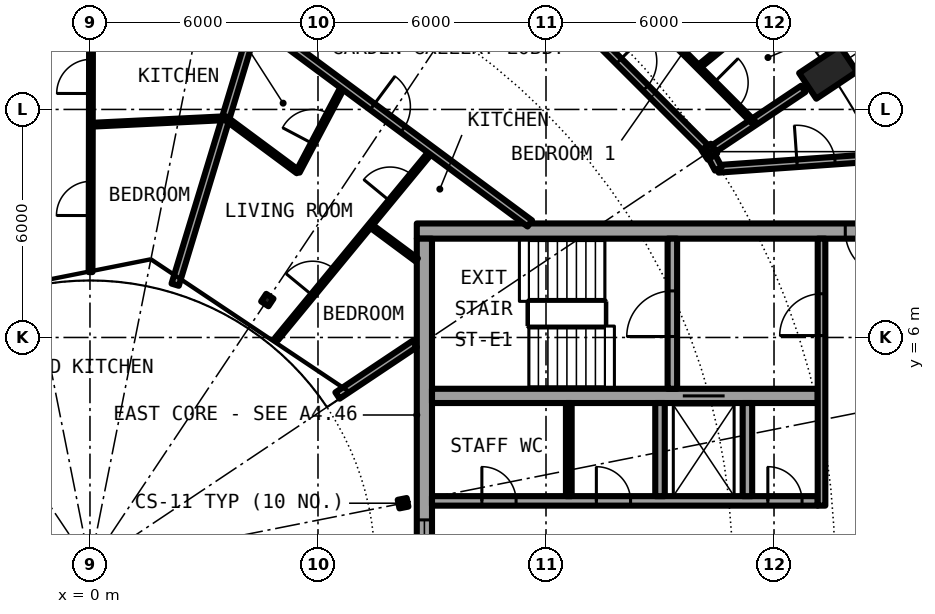
"""IFC4 building model, lengths in metres.
Left out: names, types, materials, properties, quantities, classifications, styles, units other than length and angle.
Written with IfcOpenShell. Run it as: python <this file> out.ifc"""

import sys

from ifc_helpers import new_model, si_unit, direction, frame, frame_2d, origin, origin_2d, place, context, subcontext, project, spatial, rectangle, hollow_circle, i_section, extrude, element, fill, save


model = new_model("IFC4")
c1 = context("Model", 3, precision=1e-05, world=origin(), true_north=direction((0.0, 1.0)))
c2 = subcontext(c1, "Body", "Model", "MODEL_VIEW")
j1 = project(units=[si_unit("LENGTHUNIT", "METRE"), si_unit("PLANEANGLEUNIT", "RADIAN")], contexts=[c1])
p1 = place(None, origin())
s1 = spatial("IfcSite", under=j1, at=p1, CompositionType="ELEMENT")
p2 = place(p1, origin())
s2 = spatial("IfcBuilding", under=s1, at=p2, CompositionType="ELEMENT")
p3 = place(p2, frame((0.0, 0.0, 246.25)))
s3 = spatial("IfcBuildingStorey", under=s2, at=p3, CompositionType="ELEMENT", Elevation=246.25)
p4 = place(p3, frame((19.955, 13.334, 0.0), z_axis=(-0.346819263352, -0.231767499499, 0.908845545043), x_axis=(0.555620411262, -0.831436082083, 0.0)))
e1 = element("IfcColumn", 1, at=p4, inside=s3, PredefinedType="COLUMN", context=c2, shape_type="SweptSolid", body=[
    extrude(hollow_circle(Radius=0.406, WallThickness=0.03, at=origin_2d()), origin(), (0.0, 0.0, 1.0), 3.081),
])
p5 = place(p3, frame((16.297, 10.889, 0.0), z_axis=(0.0, 0.0, 1.0), x_axis=(0.831469612303, 0.55557023302, 0.0)))
e2 = element("IfcColumn", 2, at=p5, inside=s3, PredefinedType="COLUMN", context=c2, shape_type="SweptSolid", body=[
    extrude(i_section(OverallWidth=0.3, OverallDepth=0.3, WebThickness=0.011, FlangeThickness=0.019, FilletRadius=0.027, at=origin_2d()), origin(), (0.0, 0.0, 1.0), 3.05),
])
for number, where, z_axis, x_axis in (
    (3, (8.239, 1.639, 0.0), (0.0, 0.0, 1.0), (0.981, 0.195, 0.0)),
    (4, (4.667, 6.984, 0.0), (0.0, 0.0, 1.0), (0.556, 0.831, 0.0)),
):
    element("IfcColumn", number, at=place(p3, frame(where, z_axis=z_axis, x_axis=x_axis)), inside=s3, PredefinedType="COLUMN", context=c2, shape_type="SweptSolid", body=[
        extrude(i_section(OverallWidth=0.24, OverallDepth=0.23, WebThickness=0.008, FlangeThickness=0.012, FilletRadius=0.021, at=origin_2d()), origin(), (0.0, 0.0, 1.0), 3.05),
    ])
p6 = place(p3, frame((22.0, 8.8, 0.0), z_axis=(0.0, 0.0, 1.0), x_axis=(-1.0, 0.0, 0.0)))
e5 = element("IfcWall", 5, at=p6, inside=s3, PredefinedType="SHEAR", context=c2, shape_type="SweptSolid", body=[
    extrude(rectangle(XDim=13.4, YDim=0.4, at=frame_2d((6.7, 0.0))), origin(), (0.0, 0.0, 1.0), 3.05),
])
p7 = place(p6, frame((0.925, 0.0, 0.0)))
e6 = element("IfcOpeningElement", 6, at=p7, cuts=e5, PredefinedType="OPENING", context=c2, shape_type="SweptSolid", body=[
    extrude(rectangle(XDim=1.2, YDim=2.3, at=frame_2d((0.6, 1.15))), frame((0.0, 0.21, 0.0), z_axis=(0.0, -1.0, 0.0), x_axis=(1.0, 0.0, 0.0)), (0.0, 0.0, 1.0), 0.42),
])
p8 = place(p3, frame((8.8, -8.6, 0.0), z_axis=(0.0, 0.0, 1.0), x_axis=(0.0, 1.0, 0.0)))
e7 = element("IfcWall", 7, at=p8, inside=s3, PredefinedType="SHEAR", context=c2, shape_type="SweptSolid", body=[
    extrude(rectangle(XDim=17.2, YDim=0.4, at=frame_2d((8.6, 0.0))), origin(), (0.0, 0.0, 1.0), 3.05),
])
p9 = place(p8, frame((7.4, 0.0, 0.1)))
e8 = element("IfcOpeningElement", 8, at=p9, cuts=e7, PredefinedType="OPENING", context=c2, shape_type="SweptSolid", body=[
    extrude(rectangle(XDim=2.4, YDim=2.2, at=frame_2d((1.2, 1.1))), frame((0.0, 0.21, 0.0), z_axis=(0.0, -1.0, 0.0), x_axis=(1.0, 0.0, 0.0)), (0.0, 0.0, 1.0), 0.42),
])
p10 = place(p3, frame((9.0, 1.7, 0.0), z_axis=(0.0, 0.0, 1.0), x_axis=(1.0, 0.0, 0.0)))
e9 = element("IfcWall", 9, at=p10, inside=s3, PredefinedType="SHEAR", context=c2, shape_type="SweptSolid", body=[
    extrude(rectangle(XDim=10.15, YDim=0.25, at=frame_2d((5.075, 0.0))), origin(), (0.0, 0.0, 1.0), 3.05),
])
p11 = place(p10, frame((1.312, 0.0, 0.0)))
e10 = element("IfcOpeningElement", 10, at=p11, cuts=e9, PredefinedType="OPENING", context=c2, shape_type="SweptSolid", body=[
    extrude(rectangle(XDim=0.9, YDim=2.3, at=frame_2d((0.45, 1.15))), frame((0.0, 0.135, 0.0), z_axis=(0.0, -1.0, 0.0), x_axis=(1.0, 0.0, 0.0)), (0.0, 0.0, 1.0), 0.27),
])
p12 = place(p10, frame((4.325, 0.0, 0.0)))
e11 = element("IfcOpeningElement", 11, at=p12, cuts=e9, PredefinedType="OPENING", context=c2, shape_type="SweptSolid", body=[
    extrude(rectangle(XDim=0.9, YDim=2.3, at=frame_2d((0.45, 1.15))), frame((0.0, 0.135, 0.0), z_axis=(0.0, -1.0, 0.0), x_axis=(1.0, 0.0, 0.0)), (0.0, 0.0, 1.0), 0.27),
])
p13 = place(p10, frame((8.837, 0.0, 0.0)))
e12 = element("IfcOpeningElement", 12, at=p13, cuts=e9, PredefinedType="OPENING", context=c2, shape_type="SweptSolid", body=[
    extrude(rectangle(XDim=0.9, YDim=2.3, at=frame_2d((0.45, 1.15))), frame((0.0, 0.135, 0.0), z_axis=(0.0, -1.0, 0.0), x_axis=(1.0, 0.0, 0.0)), (0.0, 0.0, 1.0), 0.27),
])
p14 = place(p3, frame((9.0, 4.462, 0.0), z_axis=(0.0, 0.0, 1.0), x_axis=(1.0, 0.0, 0.0)))
e13 = element("IfcWall", 13, at=p14, inside=s3, PredefinedType="SHEAR", context=c2, shape_type="SweptSolid", body=[
    extrude(rectangle(XDim=10.15, YDim=0.375, at=frame_2d((5.075, 0.0))), origin(), (0.0, 0.0, 1.0), 3.05),
])
p15 = place(p14, frame((6.6, 0.0, 0.0)))
e14 = element("IfcOpeningElement", 14, at=p15, cuts=e13, PredefinedType="OPENING", context=c2, shape_type="SweptSolid", body=[
    extrude(rectangle(XDim=1.1, YDim=2.3, at=frame_2d((0.55, 1.15))), frame((0.0, 0.198, 0.0), z_axis=(0.0, -1.0, 0.0), x_axis=(1.0, 0.0, 0.0)), (0.0, 0.0, 1.0), 0.395),
])
p16 = place(p3, frame((15.325, 4.65, 0.0), z_axis=(0.0, 0.0, 1.0), x_axis=(0.0, 1.0, 0.0)))
e15 = element("IfcWall", 15, at=p16, inside=s3, PredefinedType="SHEAR", context=c2, shape_type="SweptSolid", body=[
    extrude(rectangle(XDim=3.95, YDim=0.25, at=frame_2d((1.975, 0.0))), origin(), (0.0, 0.0, 1.0), 3.05),
])
p17 = place(p16, frame((1.375, 0.0, 0.0)))
e16 = element("IfcOpeningElement", 16, at=p17, cuts=e15, PredefinedType="OPENING", context=c2, shape_type="SweptSolid", body=[
    extrude(rectangle(XDim=1.2, YDim=2.3, at=frame_2d((0.6, 1.15))), frame((0.0, 0.135, 0.0), z_axis=(0.0, -1.0, 0.0), x_axis=(1.0, 0.0, 0.0)), (0.0, 0.0, 1.0), 0.27),
])
for number, where, z_axis, x_axis in (
    (17, (15.0, 1.825, 0.0), (0.0, 0.0, 1.0), (0.0, 1.0, 0.0)),
    (18, (17.3, 1.825, 0.0), (0.0, 0.0, 1.0), (0.0, 1.0, 0.0)),
):
    element("IfcWall", number, at=place(p3, frame(where, z_axis=z_axis, x_axis=x_axis)), inside=s3, PredefinedType="SOLIDWALL", context=c2, shape_type="SweptSolid", body=[
        extrude(rectangle(XDim=2.45, YDim=0.25, at=frame_2d((1.225, 0.0))), origin(), (0.0, 0.0, 1.0), 2.7),
    ])
p18 = place(p3, frame((19.25, 1.575, 0.0), z_axis=(0.0, 0.0, 1.0), x_axis=(0.0, 1.0, 0.0)))
e19 = element("IfcWall", 19, at=p18, inside=s3, PredefinedType="SOLIDWALL", context=c2, shape_type="SweptSolid", body=[
    extrude(rectangle(XDim=7.025, YDim=0.2, at=frame_2d((3.513, 0.0))), origin(), (0.0, 0.0, 1.0), 2.7),
])
p19 = place(p18, frame((4.475, 0.0, 0.0)))
e20 = element("IfcOpeningElement", 20, at=p19, cuts=e19, PredefinedType="OPENING", context=c2, shape_type="SweptSolid", body=[
    extrude(rectangle(XDim=1.1, YDim=2.3, at=frame_2d((0.55, 1.15))), frame((0.0, 0.11, 0.0), z_axis=(0.0, -1.0, 0.0), x_axis=(1.0, 0.0, 0.0)), (0.0, 0.0, 1.0), 0.22),
])
p20 = place(p3, frame((12.6, 1.825, 0.0), z_axis=(0.0, 0.0, 1.0), x_axis=(0.0, 1.0, 0.0)))
e21 = element("IfcWall", 21, at=p20, inside=s3, PredefinedType="PARTITIONING", context=c2, shape_type="SweptSolid", body=[
    extrude(rectangle(XDim=2.45, YDim=0.15, at=frame_2d((1.225, 0.0))), origin(), (0.0, 0.0, 1.0), 2.7),
])
p21 = place(p3, frame((0.015, 7.72, 0.0), z_axis=(0.0, 0.0, 1.0), x_axis=(0.00205283734, 0.999997892927, 0.0)))
e22 = element("IfcWall", 22, at=p21, inside=s3, PredefinedType="PARTITIONING", context=c2, shape_type="SweptSolid", body=[
    extrude(rectangle(XDim=6.422, YDim=0.1, at=frame_2d((3.211, 0.0))), origin(), (0.0, 0.0, 1.0), 2.7),
])
p22 = place(p21, frame((4.699, 0.0, 0.0)))
e23 = element("IfcOpeningElement", 23, at=p22, cuts=e22, PredefinedType="OPENING", context=c2, shape_type="SweptSolid", body=[
    extrude(rectangle(XDim=0.9, YDim=2.3, at=frame_2d((0.45, 1.15))), frame((0.0, 0.06, 0.0), z_axis=(0.0, -1.0, 0.0), x_axis=(1.0, 0.0, 0.0)), (0.0, 0.0, 1.0), 0.12),
])
p23 = place(p21, frame((1.488, 0.0, 0.0)))
e24 = element("IfcOpeningElement", 24, at=p23, cuts=e22, PredefinedType="OPENING", context=c2, shape_type="SweptSolid", body=[
    extrude(rectangle(XDim=0.9, YDim=2.3, at=frame_2d((0.45, 1.15))), frame((0.0, 0.06, 0.0), z_axis=(0.0, -1.0, 0.0), x_axis=(1.0, 0.0, 0.0)), (0.0, 0.0, 1.0), 0.12),
])
p24 = place(p3, frame((2.242, 7.388, 0.0), z_axis=(0.0, 0.0, 1.0), x_axis=(0.291087364513, 0.956696475493, 0.0)))
e25 = element("IfcWall", 25, at=p24, inside=s3, PredefinedType="PARTITIONING", context=c2, shape_type="SweptSolid", body=[
    extrude(rectangle(XDim=4.579, YDim=0.2, at=frame_2d((2.29, 0.0))), origin(), (0.0, 0.0, 1.0), 2.7),
])
p25 = place(p3, frame((3.571, 11.77, 0.0), z_axis=(0.0, 0.0, 1.0), x_axis=(0.289984808601, 0.957031248592, 0.0)))
e26 = element("IfcWall", 26, at=p25, inside=s3, PredefinedType="PARTITIONING", context=c2, shape_type="SweptSolid", body=[
    extrude(rectangle(XDim=2.7, YDim=0.2, at=frame_2d((1.35, 0.0))), origin(), (0.0, 0.0, 1.0), 2.7),
])
p26 = place(p3, frame((4.909, 5.958, 0.0), z_axis=(0.0, 0.0, 1.0), x_axis=(0.635941750694, 0.771737059965, 0.0)))
e27 = element("IfcWall", 27, at=p26, inside=s3, PredefinedType="PARTITIONING", context=c2, shape_type="SweptSolid", body=[
    extrude(rectangle(XDim=6.422, YDim=0.1, at=frame_2d((3.211, 0.0))), origin(), (0.0, 0.0, 1.0), 2.7),
])
p27 = place(p26, frame((4.699, 0.0, 0.0)))
e28 = element("IfcOpeningElement", 28, at=p27, cuts=e27, PredefinedType="OPENING", context=c2, shape_type="SweptSolid", body=[
    extrude(rectangle(XDim=0.9, YDim=2.3, at=frame_2d((0.45, 1.15))), frame((0.0, 0.06, 0.0), z_axis=(0.0, -1.0, 0.0), x_axis=(1.0, 0.0, 0.0)), (0.0, 0.0, 1.0), 0.12),
])
p28 = place(p26, frame((1.488, 0.0, 0.0)))
e29 = element("IfcOpeningElement", 29, at=p28, cuts=e27, PredefinedType="OPENING", context=c2, shape_type="SweptSolid", body=[
    extrude(rectangle(XDim=0.9, YDim=2.3, at=frame_2d((0.45, 1.15))), frame((0.0, 0.06, 0.0), z_axis=(0.0, -1.0, 0.0), x_axis=(1.0, 0.0, 0.0)), (0.0, 0.0, 1.0), 0.12),
])
p29 = place(p3, frame((5.472, 10.36, 0.0), z_axis=(0.0, 0.0, 1.0), x_axis=(0.467373035141, 0.884060204976, 0.0)))
e30 = element("IfcWall", 30, at=p29, inside=s3, PredefinedType="PARTITIONING", context=c2, shape_type="SweptSolid", body=[
    extrude(rectangle(XDim=2.572, YDim=0.1, at=frame_2d((1.286, 0.0))), origin(), (0.0, 0.0, 1.0), 2.7),
])
p30 = place(p29, frame((0.836, 0.0, 0.0)))
e31 = element("IfcOpeningElement", 31, at=p30, cuts=e30, PredefinedType="OPENING", context=c2, shape_type="SweptSolid", body=[
    extrude(rectangle(XDim=0.9, YDim=2.3, at=frame_2d((0.45, 1.15))), frame((0.0, 0.06, 0.0), z_axis=(0.0, -1.0, 0.0), x_axis=(1.0, 0.0, 0.0)), (0.0, 0.0, 1.0), 0.12),
])
p31 = place(p3, frame((16.012, 13.115, 0.0), z_axis=(0.0, 0.0, 1.0), x_axis=(0.773640700514, 0.633624546958, 0.0)))
e32 = element("IfcWall", 32, at=p31, inside=s3, PredefinedType="PARTITIONING", context=c2, shape_type="SweptSolid", body=[
    extrude(rectangle(XDim=3.677, YDim=0.1, at=frame_2d((1.839, 0.0))), origin(), (0.0, 0.0, 1.0), 2.7),
])
p32 = place(p3, frame((16.422, 10.972, 0.0), z_axis=(0.0, 0.0, 1.0), x_axis=(0.83131782921, 0.555797325324, 0.0)))
e33 = element("IfcWall", 33, at=p32, inside=s3, PredefinedType="PARTITIONING", context=c2, shape_type="SweptSolid", body=[
    extrude(rectangle(XDim=2.823, YDim=0.2, at=frame_2d((1.412, 0.0))), origin(), (0.0, 0.0, 1.0), 2.7),
])
p33 = place(p3, frame((6.513, 4.472, 0.0), z_axis=(0.0, 0.0, 1.0), x_axis=(0.831450132577, 0.555599385382, 0.0)))
e34 = element("IfcWall", 34, at=p33, inside=s3, PredefinedType="PARTITIONING", context=c2, shape_type="SweptSolid", body=[
    extrude(rectangle(XDim=2.443, YDim=0.2, at=frame_2d((1.221, 0.0))), origin(), (0.0, 0.0, 1.0), 2.7),
])
p34 = place(p3, frame((16.535, 10.437, 0.0), z_axis=(0.0, 0.0, 1.0), x_axis=(0.997515141784, 0.070452408845, 0.0)))
e35 = element("IfcWall", 35, at=p34, inside=s3, PredefinedType="PARTITIONING", context=c2, shape_type="SweptSolid", body=[
    extrude(rectangle(XDim=5.153, YDim=0.2, at=frame_2d((2.576, 0.0))), origin(), (0.0, 0.0, 1.0), 2.7),
])
p35 = place(p34, frame((2.076, 0.0, 0.0)))
e36 = element("IfcOpeningElement", 36, at=p35, cuts=e35, PredefinedType="OPENING", context=c2, shape_type="SweptSolid", body=[
    extrude(rectangle(XDim=1.0, YDim=2.3, at=frame_2d((0.5, 1.15))), frame((0.0, 0.11, 0.0), z_axis=(0.0, -1.0, 0.0), x_axis=(1.0, 0.0, 0.0)), (0.0, 0.0, 1.0), 0.22),
])
p36 = place(p3, frame((0.023, 11.596, 0.0), z_axis=(0.0, 0.0, 1.0), x_axis=(0.998798689193, 0.049001821055, 0.0)))
e37 = element("IfcWall", 37, at=p36, inside=s3, PredefinedType="PARTITIONING", context=c2, shape_type="SweptSolid", body=[
    extrude(rectangle(XDim=3.552, YDim=0.1, at=frame_2d((1.776, 0.0))), origin(), (0.0, 0.0, 1.0), 2.7),
])
p37 = place(p3, frame((3.569, 11.77, 0.0), z_axis=(0.0, 0.0, 1.0), x_axis=(0.803379855413, -0.5954668823, 0.0)))
e38 = element("IfcWall", 38, at=p37, inside=s3, PredefinedType="PARTITIONING", context=c2, shape_type="SweptSolid", body=[
    extrude(rectangle(XDim=2.366, YDim=0.1, at=frame_2d((1.183, 0.0))), origin(), (0.0, 0.0, 1.0), 2.7),
])
p38 = place(p3, frame((7.374, 8.949, 0.0), z_axis=(0.0, 0.0, 1.0), x_axis=(0.80332760487, -0.595537370157, 0.0)))
e39 = element("IfcWall", 39, at=p38, inside=s3, PredefinedType="PARTITIONING", context=c2, shape_type="SweptSolid", body=[
    extrude(rectangle(XDim=1.526, YDim=0.1, at=frame_2d((0.763, 0.0))), origin(), (0.0, 0.0, 1.0), 2.7),
])
p39 = place(p3, frame((4.355, 14.353, 0.0), z_axis=(0.0, 0.0, 1.0), x_axis=(0.80325776554, -0.595631565735, 0.0)))
e40 = element("IfcWall", 40, at=p39, inside=s3, PredefinedType="PARTITIONING", context=c2, shape_type="SweptSolid", body=[
    extrude(rectangle(XDim=8.987, YDim=0.2, at=frame_2d((4.494, 0.0))), origin(), (0.0, 0.0, 1.0), 2.7),
])
p40 = place(p39, frame((3.83, 0.0, 0.0)))
e41 = element("IfcOpeningElement", 41, at=p40, cuts=e40, PredefinedType="OPENING", context=c2, shape_type="SweptSolid", body=[
    extrude(rectangle(XDim=1.0, YDim=2.3, at=frame_2d((0.5, 1.15))), frame((0.0, 0.11, 0.0), z_axis=(0.0, -1.0, 0.0), x_axis=(1.0, 0.0, 0.0)), (0.0, 0.0, 1.0), 0.22),
])
p41 = place(p3, frame((10.997, 16.189, 0.0), z_axis=(0.0, 0.0, 1.0), x_axis=(0.707106781187, -0.707106781187, 0.0)))
e42 = element("IfcWall", 42, at=p41, inside=s3, PredefinedType="PARTITIONING", context=c2, shape_type="SweptSolid", body=[
    extrude(rectangle(XDim=7.343, YDim=0.2, at=frame_2d((3.671, 0.0))), origin(), (0.0, 0.0, 1.0), 2.45),
])
p42 = place(p41, frame((4.127, 0.0, 0.0)))
e43 = element("IfcOpeningElement", 43, at=p42, cuts=e42, PredefinedType="OPENING", context=c2, shape_type="SweptSolid", body=[
    extrude(rectangle(XDim=1.0, YDim=2.3, at=frame_2d((0.5, 1.15))), frame((0.0, 0.11, 0.0), z_axis=(0.0, -1.0, 0.0), x_axis=(1.0, 0.0, 0.0)), (0.0, 0.0, 1.0), 0.22),
])
p43 = place(p3, frame((16.367, 10.756, 0.0), z_axis=(0.0, 0.0, 1.0), x_axis=(0.465802239822, -0.884888848035, 0.0)))
e44 = element("IfcWall", 44, at=p43, inside=s3, PredefinedType="PARTITIONING", context=c2, shape_type="SweptSolid", body=[
    extrude(rectangle(XDim=0.361, YDim=0.2, at=frame_2d((0.18, 0.0))), origin(), (0.0, 0.0, 1.0), 2.7),
])
p44 = place(p3, frame((14.563, 14.563, 0.0), z_axis=(0.0, 0.0, 1.0), x_axis=(0.70686919808, -0.707344284494, 0.0)))
e45 = element("IfcWall", 45, at=p44, inside=s3, PredefinedType="PARTITIONING", context=c2, shape_type="SweptSolid", body=[
    extrude(rectangle(XDim=4.111, YDim=0.1, at=frame_2d((2.056, 0.0))), origin(), (0.0, 0.0, 1.0), 2.7),
])
p45 = place(p44, frame((2.626, 0.0, 0.0)))
e46 = element("IfcOpeningElement", 46, at=p45, cuts=e45, PredefinedType="OPENING", context=c2, shape_type="SweptSolid", body=[
    extrude(rectangle(XDim=0.9, YDim=2.3, at=frame_2d((0.45, 1.15))), frame((0.0, 0.06, 0.0), z_axis=(0.0, -1.0, 0.0), x_axis=(1.0, 0.0, 0.0)), (0.0, 0.0, 1.0), 0.12),
])
p46 = place(p15, origin())
e47 = element("IfcDoor", 47, at=p46, inside=s3, OperationType="DOUBLE_DOOR_SLIDING", PredefinedType="DOOR", context=c2, shape_type="SweptSolid", body=[
    extrude(rectangle(XDim=1.1, YDim=2.3, at=frame_2d((0.55, 1.15))), frame((0.0, 0.025, 0.0), z_axis=(0.0, -1.0, 0.0), x_axis=(1.0, 0.0, 0.0)), (0.0, 0.0, 1.0), 0.05),
])
fill(e14, e47)
p47 = place(p11, origin())
e48 = element("IfcDoor", 48, at=p47, inside=s3, OperationType="SINGLE_SWING_RIGHT", PredefinedType="DOOR", context=c2, shape_type="SweptSolid", body=[
    extrude(rectangle(XDim=0.9, YDim=2.3, at=frame_2d((0.45, 1.15))), frame((0.0, 0.025, 0.0), z_axis=(0.0, -1.0, 0.0), x_axis=(1.0, 0.0, 0.0)), (0.0, 0.0, 1.0), 0.05),
])
fill(e10, e48)
p48 = place(p12, origin())
e49 = element("IfcDoor", 49, at=p48, inside=s3, OperationType="SINGLE_SWING_RIGHT", PredefinedType="DOOR", context=c2, shape_type="SweptSolid", body=[
    extrude(rectangle(XDim=0.9, YDim=2.3, at=frame_2d((0.45, 1.15))), frame((0.0, 0.025, 0.0), z_axis=(0.0, -1.0, 0.0), x_axis=(1.0, 0.0, 0.0)), (0.0, 0.0, 1.0), 0.05),
])
fill(e11, e49)
p49 = place(p13, origin())
e50 = element("IfcDoor", 50, at=p49, inside=s3, OperationType="SINGLE_SWING_LEFT", PredefinedType="DOOR", context=c2, shape_type="SweptSolid", body=[
    extrude(rectangle(XDim=0.9, YDim=2.3, at=frame_2d((0.45, 1.15))), frame((0.0, 0.025, 0.0), z_axis=(0.0, -1.0, 0.0), x_axis=(1.0, 0.0, 0.0)), (0.0, 0.0, 1.0), 0.05),
])
fill(e12, e50)
p50 = place(p17, origin())
e51 = element("IfcDoor", 51, at=p50, inside=s3, OperationType="SINGLE_SWING_LEFT", PredefinedType="DOOR", context=c2, shape_type="SweptSolid", body=[
    extrude(rectangle(XDim=1.2, YDim=2.3, at=frame_2d((0.6, 1.15))), frame((0.0, 0.025, 0.0), z_axis=(0.0, -1.0, 0.0), x_axis=(1.0, 0.0, 0.0)), (0.0, 0.0, 1.0), 0.05),
])
fill(e16, e51)
p51 = place(p19, origin())
e52 = element("IfcDoor", 52, at=p51, inside=s3, OperationType="SINGLE_SWING_LEFT", PredefinedType="DOOR", context=c2, shape_type="SweptSolid", body=[
    extrude(rectangle(XDim=1.1, YDim=2.3, at=frame_2d((0.55, 1.15))), frame((0.0, 0.025, 0.0), z_axis=(0.0, -1.0, 0.0), x_axis=(1.0, 0.0, 0.0)), (0.0, 0.0, 1.0), 0.05),
])
fill(e20, e52)
p52 = place(p7, origin())
e53 = element("IfcDoor", 53, at=p52, inside=s3, OperationType="SINGLE_SWING_RIGHT", PredefinedType="DOOR", context=c2, shape_type="SweptSolid", body=[
    extrude(rectangle(XDim=1.2, YDim=2.3, at=frame_2d((0.6, 1.15))), frame((0.0, 0.025, 0.0), z_axis=(0.0, -1.0, 0.0), x_axis=(1.0, 0.0, 0.0)), (0.0, 0.0, 1.0), 0.05),
])
fill(e6, e53)
p53 = place(p9, origin())
e54 = element("IfcWindow", 54, at=p53, inside=s3, PartitioningType="SINGLE_PANEL", PredefinedType="WINDOW", context=c2, shape_type="SweptSolid", body=[
    extrude(rectangle(XDim=2.4, YDim=2.2, at=frame_2d((1.2, 1.1))), frame((0.0, 0.03, 0.0), z_axis=(0.0, -1.0, 0.0), x_axis=(1.0, 0.0, 0.0)), (0.0, 0.0, 1.0), 0.06),
])
fill(e8, e54)
p54 = place(p42, origin())
e55 = element("IfcDoor", 55, at=p54, inside=s3, OperationType="SINGLE_SWING_RIGHT", PredefinedType="DOOR", context=c2, shape_type="SweptSolid", body=[
    extrude(rectangle(XDim=1.0, YDim=2.3, at=frame_2d((0.5, 1.15))), frame((0.0, 0.025, 0.0), z_axis=(0.0, -1.0, 0.0), x_axis=(1.0, 0.0, 0.0)), (0.0, 0.0, 1.0), 0.05),
])
fill(e43, e55)
p55 = place(p45, origin())
e56 = element("IfcDoor", 56, at=p55, inside=s3, OperationType="SINGLE_SWING_RIGHT", PredefinedType="DOOR", context=c2, shape_type="SweptSolid", body=[
    extrude(rectangle(XDim=0.9, YDim=2.3, at=frame_2d((0.45, 1.15))), frame((0.0, 0.025, 0.0), z_axis=(0.0, -1.0, 0.0), x_axis=(1.0, 0.0, 0.0)), (0.0, 0.0, 1.0), 0.05),
])
fill(e46, e56)
p56 = place(p40, origin())
e57 = element("IfcDoor", 57, at=p56, inside=s3, OperationType="SINGLE_SWING_LEFT", PredefinedType="DOOR", context=c2, shape_type="SweptSolid", body=[
    extrude(rectangle(XDim=1.0, YDim=2.3, at=frame_2d((0.5, 1.15))), frame((0.0, 0.025, 0.0), z_axis=(0.0, -1.0, 0.0), x_axis=(1.0, 0.0, 0.0)), (0.0, 0.0, 1.0), 0.05),
])
fill(e41, e57)
p57 = place(p30, origin())
e58 = element("IfcDoor", 58, at=p57, inside=s3, OperationType="SINGLE_SWING_LEFT", PredefinedType="DOOR", context=c2, shape_type="SweptSolid", body=[
    extrude(rectangle(XDim=0.9, YDim=2.3, at=frame_2d((0.45, 1.15))), frame((0.0, 0.025, 0.0), z_axis=(0.0, -1.0, 0.0), x_axis=(1.0, 0.0, 0.0)), (0.0, 0.0, 1.0), 0.05),
])
fill(e31, e58)
p58 = place(p27, origin())
e59 = element("IfcDoor", 59, at=p58, inside=s3, OperationType="SINGLE_SWING_RIGHT", PredefinedType="DOOR", context=c2, shape_type="SweptSolid", body=[
    extrude(rectangle(XDim=0.9, YDim=2.3, at=frame_2d((0.45, 1.15))), frame((0.0, 0.025, 0.0), z_axis=(0.0, -1.0, 0.0), x_axis=(1.0, 0.0, 0.0)), (0.0, 0.0, 1.0), 0.05),
])
fill(e28, e59)
p59 = place(p28, origin())
e60 = element("IfcDoor", 60, at=p59, inside=s3, OperationType="SINGLE_SWING_LEFT", PredefinedType="DOOR", context=c2, shape_type="SweptSolid", body=[
    extrude(rectangle(XDim=0.9, YDim=2.3, at=frame_2d((0.45, 1.15))), frame((0.0, 0.025, 0.0), z_axis=(0.0, -1.0, 0.0), x_axis=(1.0, 0.0, 0.0)), (0.0, 0.0, 1.0), 0.05),
])
fill(e29, e60)
p60 = place(p22, origin())
e61 = element("IfcDoor", 61, at=p60, inside=s3, OperationType="SINGLE_SWING_RIGHT", PredefinedType="DOOR", context=c2, shape_type="SweptSolid", body=[
    extrude(rectangle(XDim=0.9, YDim=2.3, at=frame_2d((0.45, 1.15))), frame((0.0, 0.025, 0.0), z_axis=(0.0, -1.0, 0.0), x_axis=(1.0, 0.0, 0.0)), (0.0, 0.0, 1.0), 0.05),
])
fill(e23, e61)
p61 = place(p23, origin())
e62 = element("IfcDoor", 62, at=p61, inside=s3, OperationType="SINGLE_SWING_LEFT", PredefinedType="DOOR", context=c2, shape_type="SweptSolid", body=[
    extrude(rectangle(XDim=0.9, YDim=2.3, at=frame_2d((0.45, 1.15))), frame((0.0, 0.025, 0.0), z_axis=(0.0, -1.0, 0.0), x_axis=(1.0, 0.0, 0.0)), (0.0, 0.0, 1.0), 0.05),
])
fill(e24, e62)
p62 = place(p35, origin())
e63 = element("IfcDoor", 63, at=p62, inside=s3, OperationType="SINGLE_SWING_LEFT", PredefinedType="DOOR", context=c2, shape_type="SweptSolid", body=[
    extrude(rectangle(XDim=1.0, YDim=2.3, at=frame_2d((0.5, 1.15))), frame((0.0, 0.025, 0.0), z_axis=(0.0, -1.0, 0.0), x_axis=(1.0, 0.0, 0.0)), (0.0, 0.0, 1.0), 0.05),
])
fill(e36, e63)
save(model, sys.argv[1])
